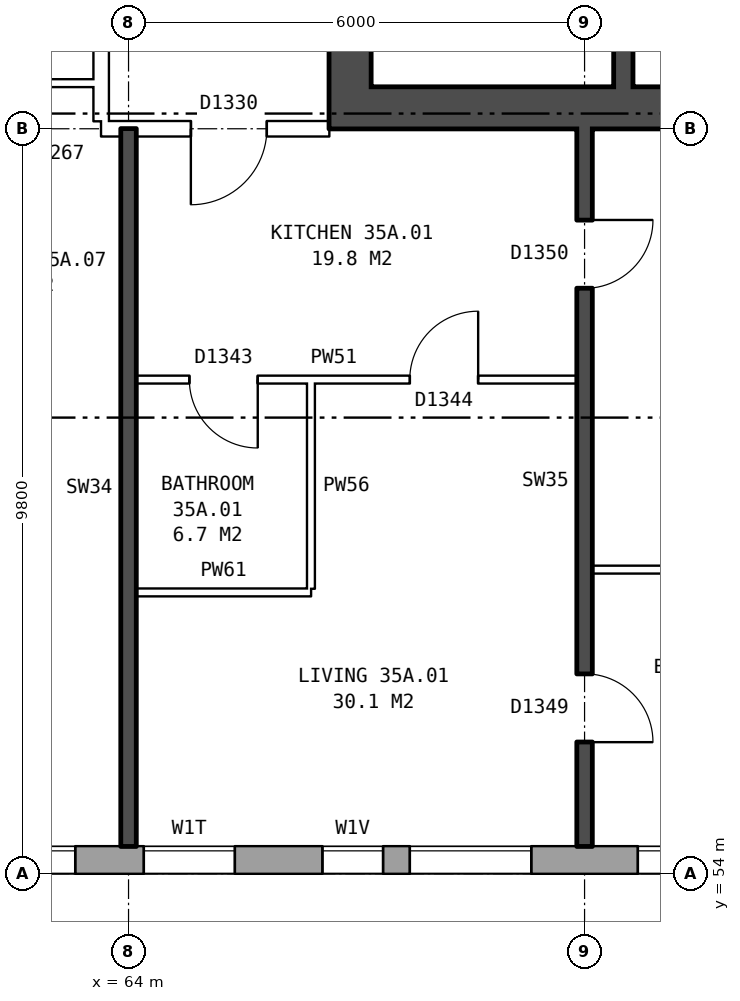
"""IFC4 building model, lengths in metres.
Left out: names, types, materials, properties, quantities, classifications, styles, units other than length and angle.
Written with IfcOpenShell. Run it as: python <this file> out.ifc"""

import sys

from ifc_helpers import new_model, si_unit, direction, frame, frame_2d, origin, place, context, subcontext, project, spatial, rectangle, extrude, element, fill, save


model = new_model("IFC4")
c1 = context("Model", 3, precision=1e-05, world=origin(), true_north=direction((0.0, 1.0)))
c2 = subcontext(c1, "Body", "Model", "MODEL_VIEW")
j1 = project(units=[si_unit("LENGTHUNIT", "METRE"), si_unit("PLANEANGLEUNIT", "RADIAN")], contexts=[c1])
p1 = place(None, origin())
s1 = spatial("IfcSite", under=j1, at=p1, CompositionType="ELEMENT")
p2 = place(p1, origin())
s2 = spatial("IfcBuilding", under=s1, at=p2, CompositionType="ELEMENT")
p3 = place(p2, frame((0.0, 0.0, 126.8)))
s3 = spatial("IfcBuildingStorey", under=s2, at=p3, CompositionType="ELEMENT", Elevation=126.8)
p4 = place(p3, frame((29.825, 54.18, 0.0), z_axis=(0.0, 0.0, 1.0), x_axis=(1.0, 0.0, 0.0)))
e1 = element("IfcWall", 1, at=p4, inside=s3, PredefinedType="STANDARD", context=c2, shape_type="SweptSolid", body=[
    extrude(rectangle(XDim=43.101, YDim=0.36, at=frame_2d((21.55, 0.0))), origin(), (0.0, 0.0, 1.0), 2.85),
])
p5 = place(p4, frame((1.875, 0.0, 0.8)))
e2 = element("IfcOpeningElement", 2, at=p5, cuts=e1, PredefinedType="OPENING", context=c2, shape_type="SweptSolid", body=[
    extrude(rectangle(XDim=1.6, YDim=1.8, at=frame_2d((0.8, 0.9))), frame((0.0, 0.19, 0.0), z_axis=(0.0, -1.0, 0.0), x_axis=(1.0, 0.0, 0.0)), (0.0, 0.0, 1.0), 0.38),
])
p6 = place(p4, frame((4.375, 0.0, 0.8)))
e3 = element("IfcOpeningElement", 3, at=p6, cuts=e1, PredefinedType="OPENING", context=c2, shape_type="SweptSolid", body=[
    extrude(rectangle(XDim=1.0, YDim=1.8, at=frame_2d((0.5, 0.9))), frame((0.0, 0.19, 0.0), z_axis=(0.0, -1.0, 0.0), x_axis=(1.0, 0.0, 0.0)), (0.0, 0.0, 1.0), 0.38),
])
p7 = place(p4, frame((5.675, 0.0, 1.6)))
e4 = element("IfcOpeningElement", 4, at=p7, cuts=e1, PredefinedType="OPENING", context=c2, shape_type="SweptSolid", body=[
    extrude(rectangle(XDim=0.6, YDim=0.9, at=frame_2d((0.3, 0.45))), frame((0.0, 0.19, 0.0), z_axis=(0.0, -1.0, 0.0), x_axis=(1.0, 0.0, 0.0)), (0.0, 0.0, 1.0), 0.38),
])
p8 = place(p4, frame((10.875, 0.0, 0.8)))
e5 = element("IfcOpeningElement", 5, at=p8, cuts=e1, PredefinedType="OPENING", context=c2, shape_type="SweptSolid", body=[
    extrude(rectangle(XDim=1.6, YDim=1.8, at=frame_2d((0.8, 0.9))), frame((0.0, 0.19, 0.0), z_axis=(0.0, -1.0, 0.0), x_axis=(1.0, 0.0, 0.0)), (0.0, 0.0, 1.0), 0.38),
])
p9 = place(p4, frame((13.875, 0.0, 0.8)))
e6 = element("IfcOpeningElement", 6, at=p9, cuts=e1, PredefinedType="OPENING", context=c2, shape_type="SweptSolid", body=[
    extrude(rectangle(XDim=1.6, YDim=1.8, at=frame_2d((0.8, 0.9))), frame((0.0, 0.19, 0.0), z_axis=(0.0, -1.0, 0.0), x_axis=(1.0, 0.0, 0.0)), (0.0, 0.0, 1.0), 0.38),
])
p10 = place(p4, frame((16.875, 0.0, 0.8)))
e7 = element("IfcOpeningElement", 7, at=p10, cuts=e1, PredefinedType="OPENING", context=c2, shape_type="SweptSolid", body=[
    extrude(rectangle(XDim=1.6, YDim=1.8, at=frame_2d((0.8, 0.9))), frame((0.0, 0.19, 0.0), z_axis=(0.0, -1.0, 0.0), x_axis=(1.0, 0.0, 0.0)), (0.0, 0.0, 1.0), 0.38),
])
p11 = place(p4, frame((19.875, 0.0, 0.8)))
e8 = element("IfcOpeningElement", 8, at=p11, cuts=e1, PredefinedType="OPENING", context=c2, shape_type="SweptSolid", body=[
    extrude(rectangle(XDim=1.6, YDim=1.8, at=frame_2d((0.8, 0.9))), frame((0.0, 0.19, 0.0), z_axis=(0.0, -1.0, 0.0), x_axis=(1.0, 0.0, 0.0)), (0.0, 0.0, 1.0), 0.38),
])
p12 = place(p4, frame((22.875, 0.0, 0.8)))
e9 = element("IfcOpeningElement", 9, at=p12, cuts=e1, PredefinedType="OPENING", context=c2, shape_type="SweptSolid", body=[
    extrude(rectangle(XDim=1.6, YDim=1.8, at=frame_2d((0.8, 0.9))), frame((0.0, 0.19, 0.0), z_axis=(0.0, -1.0, 0.0), x_axis=(1.0, 0.0, 0.0)), (0.0, 0.0, 1.0), 0.38),
])
p13 = place(p4, frame((25.875, 0.0, 0.8)))
e10 = element("IfcOpeningElement", 10, at=p13, cuts=e1, PredefinedType="OPENING", context=c2, shape_type="SweptSolid", body=[
    extrude(rectangle(XDim=1.6, YDim=1.8, at=frame_2d((0.8, 0.9))), frame((0.0, 0.19, 0.0), z_axis=(0.0, -1.0, 0.0), x_axis=(1.0, 0.0, 0.0)), (0.0, 0.0, 1.0), 0.38),
])
p14 = place(p4, frame((28.875, 0.0, 0.8)))
e11 = element("IfcOpeningElement", 11, at=p14, cuts=e1, PredefinedType="OPENING", context=c2, shape_type="SweptSolid", body=[
    extrude(rectangle(XDim=1.6, YDim=1.8, at=frame_2d((0.8, 0.9))), frame((0.0, 0.19, 0.0), z_axis=(0.0, -1.0, 0.0), x_axis=(1.0, 0.0, 0.0)), (0.0, 0.0, 1.0), 0.38),
])
p15 = place(p4, frame((31.875, 0.0, 0.8)))
e12 = element("IfcOpeningElement", 12, at=p15, cuts=e1, PredefinedType="OPENING", context=c2, shape_type="SweptSolid", body=[
    extrude(rectangle(XDim=1.6, YDim=1.8, at=frame_2d((0.8, 0.9))), frame((0.0, 0.19, 0.0), z_axis=(0.0, -1.0, 0.0), x_axis=(1.0, 0.0, 0.0)), (0.0, 0.0, 1.0), 0.38),
])
p16 = place(p4, frame((34.375, 0.0, 0.8)))
e13 = element("IfcOpeningElement", 13, at=p16, cuts=e1, PredefinedType="OPENING", context=c2, shape_type="SweptSolid", body=[
    extrude(rectangle(XDim=1.2, YDim=0.9, at=frame_2d((0.6, 0.45))), frame((0.0, 0.19, 0.0), z_axis=(0.0, -1.0, 0.0), x_axis=(1.0, 0.0, 0.0)), (0.0, 0.0, 1.0), 0.38),
])
p17 = place(p4, frame((37.875, 0.0, 0.8)))
e14 = element("IfcOpeningElement", 14, at=p17, cuts=e1, PredefinedType="OPENING", context=c2, shape_type="SweptSolid", body=[
    extrude(rectangle(XDim=1.6, YDim=1.8, at=frame_2d((0.8, 0.9))), frame((0.0, 0.19, 0.0), z_axis=(0.0, -1.0, 0.0), x_axis=(1.0, 0.0, 0.0)), (0.0, 0.0, 1.0), 0.38),
])
p18 = place(p4, frame((40.875, 0.0, 0.8)))
e15 = element("IfcOpeningElement", 15, at=p18, cuts=e1, PredefinedType="OPENING", context=c2, shape_type="SweptSolid", body=[
    extrude(rectangle(XDim=1.6, YDim=1.8, at=frame_2d((0.8, 0.9))), frame((0.0, 0.19, 0.0), z_axis=(0.0, -1.0, 0.0), x_axis=(1.0, 0.0, 0.0)), (0.0, 0.0, 1.0), 0.38),
])
p19 = place(p4, frame((7.525, 0.0, 0.8)))
e16 = element("IfcOpeningElement", 16, at=p19, cuts=e1, PredefinedType="OPENING", context=c2, shape_type="SweptSolid", body=[
    extrude(rectangle(XDim=0.6, YDim=0.9, at=frame_2d((0.3, 0.45))), frame((0.0, 0.19, 0.0), z_axis=(0.0, -1.0, 0.0), x_axis=(1.0, 0.0, 0.0)), (0.0, 0.0, 1.0), 0.38),
])
p20 = place(p4, frame((8.525, 0.0, 0.8)))
e17 = element("IfcOpeningElement", 17, at=p20, cuts=e1, PredefinedType="OPENING", context=c2, shape_type="SweptSolid", body=[
    extrude(rectangle(XDim=1.4, YDim=1.8, at=frame_2d((0.7, 0.9))), frame((0.0, 0.19, 0.0), z_axis=(0.0, -1.0, 0.0), x_axis=(1.0, 0.0, 0.0)), (0.0, 0.0, 1.0), 0.38),
])
p21 = place(p4, frame((36.725, 0.0, 1.7)))
e18 = element("IfcOpeningElement", 18, at=p21, cuts=e1, PredefinedType="OPENING", context=c2, shape_type="SweptSolid", body=[
    extrude(rectangle(XDim=0.8, YDim=0.9, at=frame_2d((0.4, 0.45))), frame((0.0, 0.19, 0.0), z_axis=(0.0, -1.0, 0.0), x_axis=(1.0, 0.0, 0.0)), (0.0, 0.0, 1.0), 0.38),
])
p22 = place(p3, frame((66.915, 63.8, 0.0), z_axis=(0.0, 0.0, 1.0), x_axis=(0.0, 1.0, 0.0)))
e19 = element("IfcWall", 19, at=p22, inside=s3, PredefinedType="SHEAR", context=c2, shape_type="SweptSolid", body=[
    extrude(rectangle(XDim=12.4, YDim=0.55, at=frame_2d((6.2, 0.0))), origin(), (0.0, 0.0, 1.0), 2.85),
])
p23 = place(p22, frame((1.325, 0.0, 0.0)))
e20 = element("IfcOpeningElement", 20, at=p23, cuts=e19, PredefinedType="OPENING", context=c2, shape_type="SweptSolid", body=[
    extrude(rectangle(XDim=1.1, YDim=2.1, at=frame_2d((0.55, 1.05))), frame((0.0, 0.285, 0.0), z_axis=(0.0, -1.0, 0.0), x_axis=(1.0, 0.0, 0.0)), (0.0, 0.0, 1.0), 0.57),
])
p24 = place(p22, frame((3.6, 0.0, 0.0)))
e21 = element("IfcOpeningElement", 21, at=p24, cuts=e19, PredefinedType="OPENING", context=c2, shape_type="SweptSolid", body=[
    extrude(rectangle(XDim=1.1, YDim=2.1, at=frame_2d((0.55, 1.05))), frame((0.0, 0.285, 0.0), z_axis=(0.0, -1.0, 0.0), x_axis=(1.0, 0.0, 0.0)), (0.0, 0.0, 1.0), 0.57),
])
p25 = place(p22, frame((5.8, 0.0, 0.0)))
e22 = element("IfcOpeningElement", 22, at=p25, cuts=e19, PredefinedType="OPENING", context=c2, shape_type="SweptSolid", body=[
    extrude(rectangle(XDim=1.1, YDim=2.1, at=frame_2d((0.55, 1.05))), frame((0.0, 0.285, 0.0), z_axis=(0.0, -1.0, 0.0), x_axis=(1.0, 0.0, 0.0)), (0.0, 0.0, 1.0), 0.57),
])
p26 = place(p22, frame((8.0, 0.0, 0.0)))
e23 = element("IfcOpeningElement", 23, at=p26, cuts=e19, PredefinedType="OPENING", context=c2, shape_type="SweptSolid", body=[
    extrude(rectangle(XDim=1.1, YDim=2.1, at=frame_2d((0.55, 1.05))), frame((0.0, 0.285, 0.0), z_axis=(0.0, -1.0, 0.0), x_axis=(1.0, 0.0, 0.0)), (0.0, 0.0, 1.0), 0.57),
])
p27 = place(p22, frame((9.9, 0.0, 0.0)))
e24 = element("IfcOpeningElement", 24, at=p27, cuts=e19, PredefinedType="OPENING", context=c2, shape_type="SweptSolid", body=[
    extrude(rectangle(XDim=1.1, YDim=2.1, at=frame_2d((0.55, 1.05))), frame((0.0, 0.285, 0.0), z_axis=(0.0, -1.0, 0.0), x_axis=(1.0, 0.0, 0.0)), (0.0, 0.0, 1.0), 0.57),
])
p28 = place(p3, frame((67.19, 64.075, 0.0), z_axis=(0.0, 0.0, 1.0), x_axis=(1.0, 0.0, 0.0)))
e25 = element("IfcWall", 25, at=p28, inside=s3, PredefinedType="SHEAR", context=c2, shape_type="SweptSolid", body=[
    extrude(rectangle(XDim=7.9, YDim=0.55, at=frame_2d((3.95, 0.0))), origin(), (0.0, 0.0, 1.0), 2.85),
])
p29 = place(p3, frame((70.51, 64.35, 0.0), z_axis=(0.0, 0.0, 1.0), x_axis=(0.0, 1.0, 0.0)))
e26 = element("IfcWall", 26, at=p29, inside=s3, PredefinedType="SHEAR", context=c2, shape_type="SweptSolid", body=[
    extrude(rectangle(XDim=2.375, YDim=0.25, at=frame_2d((1.188, 0.0))), origin(), (0.0, 0.0, 1.0), 2.85),
])
p30 = place(p3, frame((63.64, 63.9, 0.0), z_axis=(0.0, 0.0, 1.0), x_axis=(0.0, 1.0, 0.0)))
e27 = element("IfcWall", 27, at=p30, inside=s3, PredefinedType="PARTITIONING", context=c2, shape_type="SweptSolid", body=[
    extrude(rectangle(XDim=12.2, YDim=0.2, at=frame_2d((6.1, 0.0))), origin(), (0.0, 0.0, 1.0), 2.85),
])
p31 = place(p30, frame((5.1, 0.0, 0.0)))
e28 = element("IfcOpeningElement", 28, at=p31, cuts=e27, PredefinedType="OPENING", context=c2, shape_type="SweptSolid", body=[
    extrude(rectangle(XDim=2.0, YDim=2.1, at=frame_2d((1.0, 1.05))), frame((0.0, 0.11, 0.0), z_axis=(0.0, -1.0, 0.0), x_axis=(1.0, 0.0, 0.0)), (0.0, 0.0, 1.0), 0.22),
])
p32 = place(p3, frame((64.1, 57.7, 0.0), z_axis=(0.0, 0.0, 1.0), x_axis=(1.0, 0.0, 0.0)))
e29 = element("IfcWall", 29, at=p32, inside=s3, PredefinedType="PARTITIONING", context=c2, shape_type="SweptSolid", body=[
    extrude(rectangle(XDim=2.3, YDim=0.1, at=frame_2d((1.15, 0.0))), origin(), (0.0, 0.0, 1.0), 2.85),
])
p33 = place(p3, frame((70.1, 58.0, 0.0), z_axis=(0.0, 0.0, 1.0), x_axis=(1.0, 0.0, 0.0)))
e30 = element("IfcWall", 30, at=p33, inside=s3, PredefinedType="PARTITIONING", context=c2, shape_type="SweptSolid", body=[
    extrude(rectangle(XDim=5.54, YDim=0.1, at=frame_2d((2.77, 0.0))), origin(), (0.0, 0.0, 1.0), 2.85),
])
p34 = place(p3, frame((64.1, 60.5, 0.0), z_axis=(0.0, 0.0, 1.0), x_axis=(1.0, 0.0, 0.0)))
e31 = element("IfcWall", 31, at=p34, inside=s3, PredefinedType="PARTITIONING", context=c2, shape_type="SweptSolid", body=[
    extrude(rectangle(XDim=5.8, YDim=0.1, at=frame_2d((2.9, 0.0))), origin(), (0.0, 0.0, 1.0), 2.85),
])
p35 = place(p34, frame((3.6, 0.0, 0.0)))
e32 = element("IfcOpeningElement", 32, at=p35, cuts=e31, PredefinedType="OPENING", context=c2, shape_type="SweptSolid", body=[
    extrude(rectangle(XDim=0.9, YDim=2.1, at=frame_2d((0.45, 1.05))), frame((0.0, 0.06, 0.0), z_axis=(0.0, -1.0, 0.0), x_axis=(1.0, 0.0, 0.0)), (0.0, 0.0, 1.0), 0.12),
])
p36 = place(p34, frame((0.7, 0.0, 0.0)))
e33 = element("IfcOpeningElement", 33, at=p36, cuts=e31, PredefinedType="OPENING", context=c2, shape_type="SweptSolid", body=[
    extrude(rectangle(XDim=0.9, YDim=2.1, at=frame_2d((0.45, 1.05))), frame((0.0, 0.06, 0.0), z_axis=(0.0, -1.0, 0.0), x_axis=(1.0, 0.0, 0.0)), (0.0, 0.0, 1.0), 0.12),
])
p37 = place(p3, frame((63.64, 63.8, 0.0), z_axis=(0.0, 0.0, 1.0), x_axis=(1.0, 0.0, 0.0)))
e34 = element("IfcWall", 34, at=p37, inside=s3, PredefinedType="PARTITIONING", context=c2, shape_type="SweptSolid", body=[
    extrude(rectangle(XDim=3.0, YDim=0.2, at=frame_2d((1.5, 0.0))), origin(), (0.0, 0.0, 1.0), 2.85),
])
p38 = place(p37, frame((1.18, 0.0, 0.0)))
e35 = element("IfcOpeningElement", 35, at=p38, cuts=e34, PredefinedType="OPENING", context=c2, shape_type="SweptSolid", body=[
    extrude(rectangle(XDim=1.0, YDim=2.1, at=frame_2d((0.5, 1.05))), frame((0.0, 0.11, 0.0), z_axis=(0.0, -1.0, 0.0), x_axis=(1.0, 0.0, 0.0)), (0.0, 0.0, 1.0), 0.22),
])
p39 = place(p3, frame((61.0, 64.4, 0.0), z_axis=(0.0, 0.0, 1.0), x_axis=(1.0, 0.0, 0.0)))
e36 = element("IfcWall", 36, at=p39, inside=s3, PredefinedType="PARTITIONING", context=c2, shape_type="SweptSolid", body=[
    extrude(rectangle(XDim=2.64, YDim=0.1, at=frame_2d((1.32, 0.0))), origin(), (0.0, 0.0, 1.0), 2.85),
])
p40 = place(p3, frame((64.0, 54.36, 0.0), z_axis=(0.0, 0.0, 1.0), x_axis=(0.0, 1.0, 0.0)))
e37 = element("IfcWall", 37, at=p40, inside=s3, PredefinedType="SOLIDWALL", context=c2, shape_type="SweptSolid", body=[
    extrude(rectangle(XDim=9.44, YDim=0.2, at=frame_2d((4.72, 0.0))), origin(), (0.0, 0.0, 1.0), 2.85),
])
p41 = place(p3, frame((66.4, 57.75, 0.0), z_axis=(0.0, 0.0, 1.0), x_axis=(0.0, 1.0, 0.0)))
e38 = element("IfcWall", 38, at=p41, inside=s3, PredefinedType="PARTITIONING", context=c2, shape_type="SweptSolid", body=[
    extrude(rectangle(XDim=2.7, YDim=0.1, at=frame_2d((1.35, 0.0))), origin(), (0.0, 0.0, 1.0), 2.85),
])
p42 = place(p3, frame((70.0, 54.36, 0.0), z_axis=(0.0, 0.0, 1.0), x_axis=(0.0, 1.0, 0.0)))
e39 = element("IfcWall", 39, at=p42, inside=s3, PredefinedType="SOLIDWALL", context=c2, shape_type="SweptSolid", body=[
    extrude(rectangle(XDim=9.44, YDim=0.2, at=frame_2d((4.72, 0.0))), origin(), (0.0, 0.0, 1.0), 2.85),
])
p43 = place(p42, frame((1.37, 0.0, 0.0)))
e40 = element("IfcOpeningElement", 40, at=p43, cuts=e39, PredefinedType="OPENING", context=c2, shape_type="SweptSolid", body=[
    extrude(rectangle(XDim=0.9, YDim=2.1, at=frame_2d((0.45, 1.05))), frame((0.0, 0.11, 0.0), z_axis=(0.0, -1.0, 0.0), x_axis=(1.0, 0.0, 0.0)), (0.0, 0.0, 1.0), 0.22),
])
p44 = place(p42, frame((7.34, 0.0, 0.0)))
e41 = element("IfcOpeningElement", 41, at=p44, cuts=e39, PredefinedType="OPENING", context=c2, shape_type="SweptSolid", body=[
    extrude(rectangle(XDim=0.9, YDim=2.1, at=frame_2d((0.45, 1.05))), frame((0.0, 0.11, 0.0), z_axis=(0.0, -1.0, 0.0), x_axis=(1.0, 0.0, 0.0)), (0.0, 0.0, 1.0), 0.22),
])
p45 = place(p15, origin())
e42 = element("IfcWindow", 42, at=p45, inside=s3, PartitioningType="SINGLE_PANEL", PredefinedType="WINDOW", context=c2, shape_type="SweptSolid", body=[
    extrude(rectangle(XDim=1.6, YDim=1.8, at=frame_2d((0.8, 0.9))), frame((0.0, 0.15, 0.0), z_axis=(0.0, -1.0, 0.0), x_axis=(1.0, 0.0, 0.0)), (0.0, 0.0, 1.0), 0.06),
])
fill(e12, e42)
p46 = place(p16, origin())
e43 = element("IfcWindow", 43, at=p46, inside=s3, PartitioningType="SINGLE_PANEL", PredefinedType="WINDOW", context=c2, shape_type="SweptSolid", body=[
    extrude(rectangle(XDim=1.2, YDim=0.9, at=frame_2d((0.6, 0.45))), frame((0.0, 0.15, 0.0), z_axis=(0.0, -1.0, 0.0), x_axis=(1.0, 0.0, 0.0)), (0.0, 0.0, 1.0), 0.06),
])
fill(e13, e43)
p47 = place(p17, origin())
e44 = element("IfcWindow", 44, at=p47, inside=s3, PartitioningType="SINGLE_PANEL", PredefinedType="WINDOW", context=c2, shape_type="SweptSolid", body=[
    extrude(rectangle(XDim=1.6, YDim=1.8, at=frame_2d((0.8, 0.9))), frame((0.0, 0.15, 0.0), z_axis=(0.0, -1.0, 0.0), x_axis=(1.0, 0.0, 0.0)), (0.0, 0.0, 1.0), 0.06),
])
fill(e14, e44)
p48 = place(p18, origin())
e45 = element("IfcWindow", 45, at=p48, inside=s3, PartitioningType="SINGLE_PANEL", PredefinedType="WINDOW", context=c2, shape_type="SweptSolid", body=[
    extrude(rectangle(XDim=1.6, YDim=1.8, at=frame_2d((0.8, 0.9))), frame((0.0, 0.15, 0.0), z_axis=(0.0, -1.0, 0.0), x_axis=(1.0, 0.0, 0.0)), (0.0, 0.0, 1.0), 0.06),
])
fill(e15, e45)
p49 = place(p43, frame((0.9, 0.0, 0.0), z_axis=(0.0, 0.0, 1.0), x_axis=(-1.0, 0.0, 0.0)))
e46 = element("IfcDoor", 46, at=p49, inside=s3, OperationType="SINGLE_SWING_RIGHT", PredefinedType="DOOR", context=c2, shape_type="SweptSolid", body=[
    extrude(rectangle(XDim=0.9, YDim=2.1, at=frame_2d((0.45, 1.05))), frame((0.0, 0.025, 0.0), z_axis=(0.0, -1.0, 0.0), x_axis=(1.0, 0.0, 0.0)), (0.0, 0.0, 1.0), 0.05),
])
fill(e40, e46)
p50 = place(p44, frame((0.9, 0.0, 0.0), z_axis=(0.0, 0.0, 1.0), x_axis=(-1.0, 0.0, 0.0)))
e47 = element("IfcDoor", 47, at=p50, inside=s3, OperationType="SINGLE_SWING_LEFT", PredefinedType="DOOR", context=c2, shape_type="SweptSolid", body=[
    extrude(rectangle(XDim=0.9, YDim=2.1, at=frame_2d((0.45, 1.05))), frame((0.0, 0.025, 0.0), z_axis=(0.0, -1.0, 0.0), x_axis=(1.0, 0.0, 0.0)), (0.0, 0.0, 1.0), 0.05),
])
fill(e41, e47)
p51 = place(p38, frame((1.0, 0.0, 0.0), z_axis=(0.0, 0.0, 1.0), x_axis=(-1.0, 0.0, 0.0)))
e48 = element("IfcDoor", 48, at=p51, inside=s3, OperationType="SINGLE_SWING_RIGHT", PredefinedType="DOOR", context=c2, shape_type="SweptSolid", body=[
    extrude(rectangle(XDim=1.0, YDim=2.1, at=frame_2d((0.5, 1.05))), frame((0.0, 0.025, 0.0), z_axis=(0.0, -1.0, 0.0), x_axis=(1.0, 0.0, 0.0)), (0.0, 0.0, 1.0), 0.05),
])
fill(e35, e48)
p52 = place(p35, origin())
e49 = element("IfcDoor", 49, at=p52, inside=s3, OperationType="SINGLE_SWING_RIGHT", PredefinedType="DOOR", context=c2, shape_type="SweptSolid", body=[
    extrude(rectangle(XDim=0.9, YDim=2.1, at=frame_2d((0.45, 1.05))), frame((0.0, 0.025, 0.0), z_axis=(0.0, -1.0, 0.0), x_axis=(1.0, 0.0, 0.0)), (0.0, 0.0, 1.0), 0.05),
])
fill(e32, e49)
p53 = place(p36, frame((0.9, 0.0, 0.0), z_axis=(0.0, 0.0, 1.0), x_axis=(-1.0, 0.0, 0.0)))
e50 = element("IfcDoor", 50, at=p53, inside=s3, OperationType="SINGLE_SWING_LEFT", PredefinedType="DOOR", context=c2, shape_type="SweptSolid", body=[
    extrude(rectangle(XDim=0.9, YDim=2.1, at=frame_2d((0.45, 1.05))), frame((0.0, 0.025, 0.0), z_axis=(0.0, -1.0, 0.0), x_axis=(1.0, 0.0, 0.0)), (0.0, 0.0, 1.0), 0.05),
])
fill(e33, e50)
p54 = place(p21, origin())
e51 = element("IfcWindow", 51, at=p54, inside=s3, PartitioningType="SINGLE_PANEL", PredefinedType="WINDOW", context=c2, shape_type="SweptSolid", body=[
    extrude(rectangle(XDim=0.8, YDim=0.9, at=frame_2d((0.4, 0.45))), frame((0.0, 0.15, 0.0), z_axis=(0.0, -1.0, 0.0), x_axis=(1.0, 0.0, 0.0)), (0.0, 0.0, 1.0), 0.06),
])
fill(e18, e51)
save(model, sys.argv[1])
